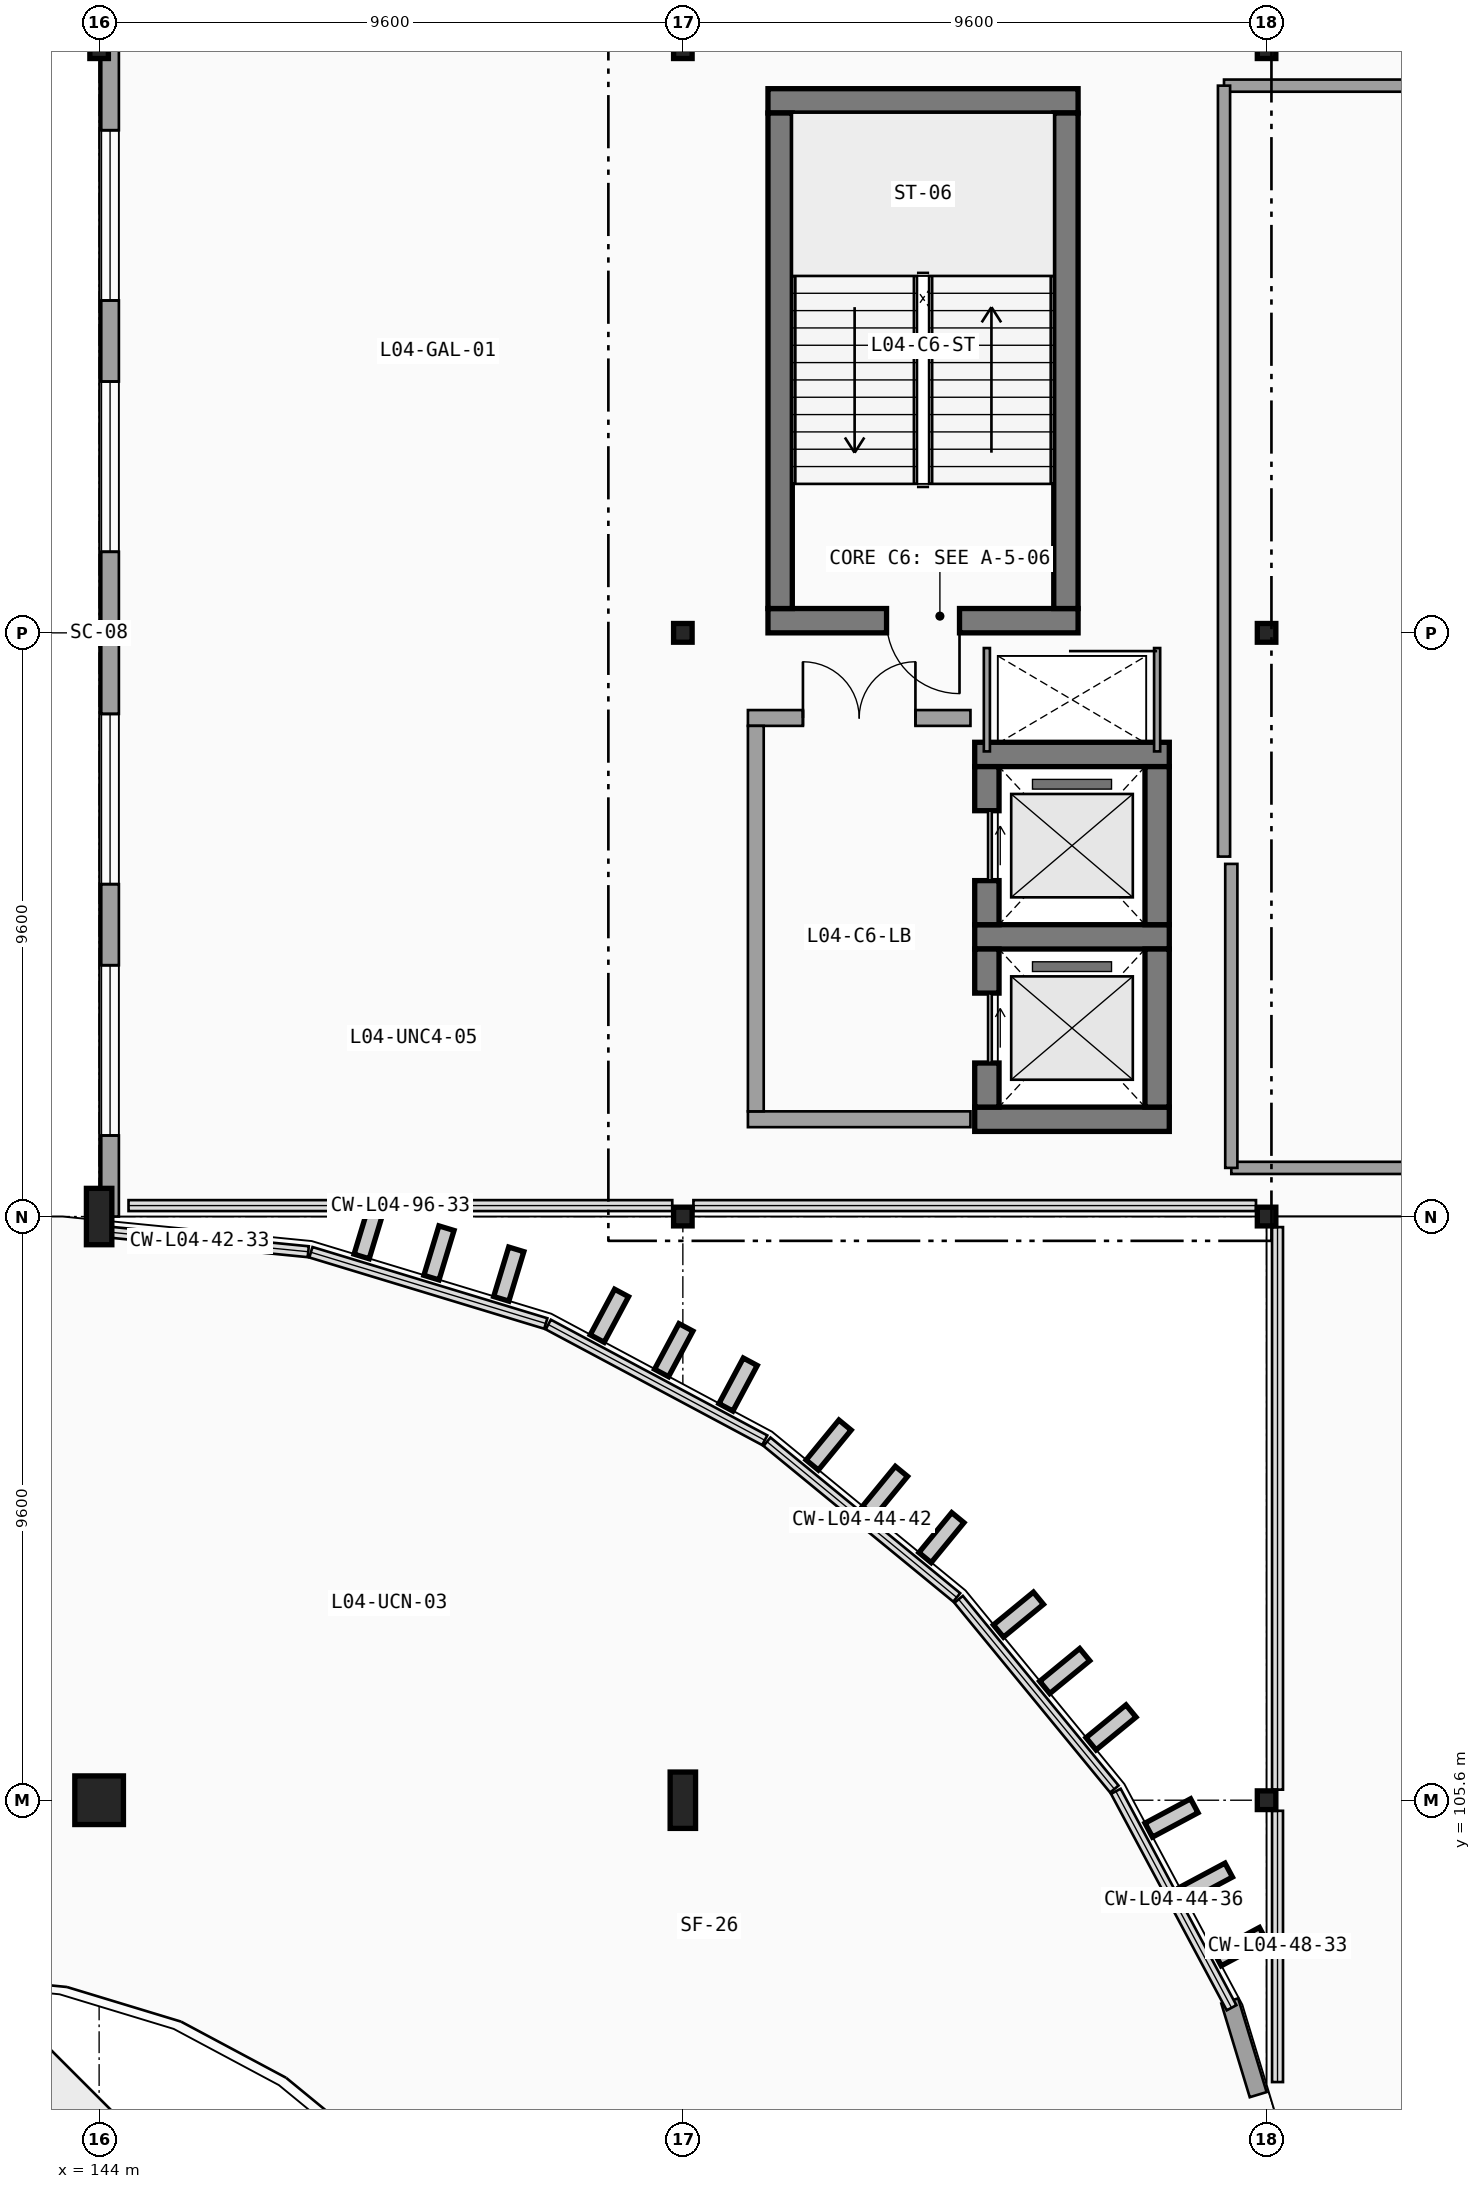
"""IFC4 building model, lengths in metres.
Left out: names, types, materials, properties, quantities, classifications, styles, units other than length and angle.
Written with IfcOpenShell. Run it as: python <this file> out.ifc"""

import sys

from ifc_helpers import new_model, si_unit, direction, frame, frame_2d, origin, origin_2d, place, context, subcontext, project, spatial, rectangle, i_section, extrude, element, fill, save


model = new_model("IFC4")
c1 = context("Model", 3, precision=1e-05, world=origin(), true_north=direction((0.0, 1.0)))
c2 = subcontext(c1, "Body", "Model", "MODEL_VIEW")
j1 = project(units=[si_unit("LENGTHUNIT", "METRE"), si_unit("PLANEANGLEUNIT", "RADIAN")], contexts=[c1])
p1 = place(None, origin())
s1 = spatial("IfcSite", under=j1, at=p1, CompositionType="ELEMENT")
p2 = place(p1, origin())
s2 = spatial("IfcBuilding", under=s1, at=p2, CompositionType="ELEMENT")
p3 = place(p2, frame((0.0, 0.0, 18.6)))
s3 = spatial("IfcBuildingStorey", under=s2, at=p3, CompositionType="ELEMENT", Elevation=18.6)
p4 = place(p3, frame((144.0, 105.6, 0.0), z_axis=(0.0, 0.0, 1.0), x_axis=(1.0, 0.0, 0.0)))
e1 = element("IfcColumn", 1, at=p4, inside=s3, PredefinedType="COLUMN", context=c2, shape_type="SweptSolid", body=[
    extrude(rectangle(XDim=0.8, YDim=0.8, at=origin_2d()), origin(), (0.0, 0.0, 1.0), 4.5),
])
p5 = place(p3, frame((144.0, 115.2, 0.0), z_axis=(0.0, 0.0, 1.0), x_axis=(1.0, 0.0, 0.0)))
e2 = element("IfcColumn", 2, at=p5, inside=s3, PredefinedType="COLUMN", context=c2, shape_type="SweptSolid", body=[
    extrude(i_section(OverallWidth=0.418, OverallDepth=0.927, WebThickness=0.019, FlangeThickness=0.032, FilletRadius=0.024, at=origin_2d()), origin(), (0.0, 0.0, 1.0), 4.5),
])
for number, where, z_axis, x_axis in (
    (3, (144.0, 124.8, 0.0), (0.0, 0.0, 1.0), (1.0, 0.0, 0.0)),
    (4, (144.0, 134.4, 0.0), (0.0, 0.0, 1.0), (1.0, 0.0, 0.0)),
):
    element("IfcColumn", number, at=place(p3, frame(where, z_axis=z_axis, x_axis=x_axis)), inside=s3, PredefinedType="COLUMN", context=c2, shape_type="SweptSolid", body=[
        extrude(i_section(OverallWidth=0.305, OverallDepth=0.308, WebThickness=0.01, FlangeThickness=0.015, FilletRadius=0.013, at=origin_2d()), origin(), (0.0, 0.0, 1.0), 4.5),
    ])
p6 = place(p3, frame((153.6, 105.6, 0.0), z_axis=(0.0, 0.0, 1.0), x_axis=(1.0, 0.0, 0.0)))
e5 = element("IfcColumn", 5, at=p6, inside=s3, PredefinedType="COLUMN", context=c2, shape_type="SweptSolid", body=[
    extrude(i_section(OverallWidth=0.418, OverallDepth=0.927, WebThickness=0.019, FlangeThickness=0.032, FilletRadius=0.024, at=origin_2d()), origin(), (0.0, 0.0, 1.0), 4.5),
])
for number, where, z_axis, x_axis in (
    (6, (153.6, 115.2, 0.0), (0.0, 0.0, 1.0), (1.0, 0.0, 0.0)),
    (7, (153.6, 124.8, 0.0), (0.0, 0.0, 1.0), (1.0, 0.0, 0.0)),
    (8, (153.6, 134.4, 0.0), (0.0, 0.0, 1.0), (1.0, 0.0, 0.0)),
    (9, (163.2, 105.6, 0.0), (0.0, 0.0, 1.0), (1.0, 0.0, 0.0)),
    (10, (163.2, 115.2, 0.0), (0.0, 0.0, 1.0), (1.0, 0.0, 0.0)),
    (11, (163.2, 124.8, 0.0), (0.0, 0.0, 1.0), (1.0, 0.0, 0.0)),
    (12, (163.2, 134.4, 0.0), (0.0, 0.0, 1.0), (1.0, 0.0, 0.0)),
):
    element("IfcColumn", number, at=place(p3, frame(where, z_axis=z_axis, x_axis=x_axis)), inside=s3, PredefinedType="COLUMN", context=c2, shape_type="SweptSolid", body=[
        extrude(i_section(OverallWidth=0.305, OverallDepth=0.308, WebThickness=0.01, FlangeThickness=0.015, FilletRadius=0.013, at=origin_2d()), origin(), (0.0, 0.0, 1.0), 4.5),
    ])
p7 = place(p3, frame((144.18, 134.4, 0.0), z_axis=(0.0, 0.0, 1.0), x_axis=(0.0, -1.0, 0.0)))
e13 = element("IfcWall", 13, at=p7, inside=s3, PredefinedType="SOLIDWALL", context=c2, shape_type="SweptSolid", body=[
    extrude(rectangle(XDim=9.6, YDim=0.29, at=frame_2d((4.8, 0.0))), origin(), (0.0, 0.0, 1.0), 3.562),
])
p8 = place(p7, frame((4.133, 0.0, 0.95), z_axis=(0.0, 0.0, 1.0), x_axis=(-1.0, 0.0, 0.0)))
e14 = element("IfcOpeningElement", 14, at=p8, cuts=e13, PredefinedType="OPENING", context=c2, shape_type="SweptSolid", body=[
    extrude(rectangle(XDim=2.8, YDim=1.9, at=frame_2d((1.4, 0.95))), frame((0.0, 0.155, 0.0), z_axis=(0.0, -1.0, 0.0), x_axis=(1.0, 0.0, 0.0)), (0.0, 0.0, 1.0), 0.31),
])
p9 = place(p7, frame((8.267, 0.0, 0.95), z_axis=(0.0, 0.0, 1.0), x_axis=(-1.0, 0.0, 0.0)))
e15 = element("IfcOpeningElement", 15, at=p9, cuts=e13, PredefinedType="OPENING", context=c2, shape_type="SweptSolid", body=[
    extrude(rectangle(XDim=2.8, YDim=1.9, at=frame_2d((1.4, 0.95))), frame((0.0, 0.155, 0.0), z_axis=(0.0, -1.0, 0.0), x_axis=(1.0, 0.0, 0.0)), (0.0, 0.0, 1.0), 0.31),
])
p10 = place(p3, frame((144.18, 124.8, 0.0), z_axis=(0.0, 0.0, 1.0), x_axis=(0.0, -1.0, 0.0)))
e16 = element("IfcWall", 16, at=p10, inside=s3, PredefinedType="SOLIDWALL", context=c2, shape_type="SweptSolid", body=[
    extrude(rectangle(XDim=9.6, YDim=0.29, at=frame_2d((4.8, 0.0))), origin(), (0.0, 0.0, 1.0), 3.313),
])
p11 = place(p10, frame((4.133, 0.0, 0.95), z_axis=(0.0, 0.0, 1.0), x_axis=(-1.0, 0.0, 0.0)))
e17 = element("IfcOpeningElement", 17, at=p11, cuts=e16, PredefinedType="OPENING", context=c2, shape_type="SweptSolid", body=[
    extrude(rectangle(XDim=2.8, YDim=1.9, at=frame_2d((1.4, 0.95))), frame((0.0, 0.155, 0.0), z_axis=(0.0, -1.0, 0.0), x_axis=(1.0, 0.0, 0.0)), (0.0, 0.0, 1.0), 0.31),
])
p12 = place(p10, frame((8.267, 0.0, 0.95), z_axis=(0.0, 0.0, 1.0), x_axis=(-1.0, 0.0, 0.0)))
e18 = element("IfcOpeningElement", 18, at=p12, cuts=e16, PredefinedType="OPENING", context=c2, shape_type="SweptSolid", body=[
    extrude(rectangle(XDim=2.8, YDim=1.9, at=frame_2d((1.4, 0.95))), frame((0.0, 0.155, 0.0), z_axis=(0.0, -1.0, 0.0), x_axis=(1.0, 0.0, 0.0)), (0.0, 0.0, 1.0), 0.31),
])
p13 = place(p3, frame((163.062, 100.757, 0.0), z_axis=(0.0, 0.0, 1.0), x_axis=(-0.290196653702, 0.956967032964, 0.0)))
e19 = element("IfcWall", 19, at=p13, inside=s3, PredefinedType="SOLIDWALL", context=c2, shape_type="SweptSolid", body=[
    extrude(rectangle(XDim=1.611, YDim=0.29, at=frame_2d((0.806, 0.0))), origin(), (0.0, 0.0, 1.0), 3.313),
])
p14 = place(p3, frame((155.0, 125.0, 0.0), z_axis=(0.0, 0.0, 1.0), x_axis=(1.0, 0.0, 0.0)))
e20 = element("IfcWall", 20, at=p14, inside=s3, PredefinedType="SHEAR", context=c2, shape_type="SweptSolid", body=[
    extrude(rectangle(XDim=5.1, YDim=0.4, at=frame_2d((2.55, 0.0))), origin(), (0.0, 0.0, 1.0), 4.24),
])
p15 = place(p14, frame((3.15, 0.0, 0.0), z_axis=(0.0, 0.0, 1.0), x_axis=(-1.0, 0.0, 0.0)))
e21 = element("IfcOpeningElement", 21, at=p15, cuts=e20, PredefinedType="OPENING", context=c2, shape_type="SweptSolid", body=[
    extrude(rectangle(XDim=1.2, YDim=2.2, at=frame_2d((0.6, 1.1))), frame((0.0, 0.21, 0.0), z_axis=(0.0, -1.0, 0.0), x_axis=(1.0, 0.0, 0.0)), (0.0, 0.0, 1.0), 0.42),
])
p16 = place(p3, frame((160.1, 133.55, 0.0), z_axis=(0.0, 0.0, 1.0), x_axis=(-1.0, 0.0, 0.0)))
e22 = element("IfcWall", 22, at=p16, inside=s3, PredefinedType="SHEAR", context=c2, shape_type="SweptSolid", body=[
    extrude(rectangle(XDim=5.1, YDim=0.4, at=frame_2d((2.55, 0.0))), origin(), (0.0, 0.0, 1.0), 4.24),
])
for number, where, z_axis, x_axis in (
    (23, (155.2, 133.35, 0.0), (0.0, 0.0, 1.0), (0.0, -1.0, 0.0)),
    (24, (159.9, 125.2, 0.0), (0.0, 0.0, 1.0), (0.0, 1.0, 0.0)),
):
    element("IfcWall", number, at=place(p3, frame(where, z_axis=z_axis, x_axis=x_axis)), inside=s3, PredefinedType="SHEAR", context=c2, shape_type="SweptSolid", body=[
        extrude(rectangle(XDim=8.15, YDim=0.4, at=frame_2d((4.075, 0.0))), origin(), (0.0, 0.0, 1.0), 4.24),
    ])
for number, where, z_axis, x_axis in (
    (25, (158.4, 116.8, 0.0), (0.0, 0.0, 1.0), (1.0, 0.0, 0.0)),
    (26, (161.6, 119.8, 0.0), (0.0, 0.0, 1.0), (-1.0, 0.0, 0.0)),
):
    element("IfcWall", number, at=place(p3, frame(where, z_axis=z_axis, x_axis=x_axis)), inside=s3, PredefinedType="SHEAR", context=c2, shape_type="SweptSolid", body=[
        extrude(rectangle(XDim=3.2, YDim=0.4, at=frame_2d((1.6, 0.0))), origin(), (0.0, 0.0, 1.0), 4.24),
    ])
p17 = place(p3, frame((158.6, 119.6, 0.0), z_axis=(0.0, 0.0, 1.0), x_axis=(0.0, -1.0, 0.0)))
e27 = element("IfcWall", 27, at=p17, inside=s3, PredefinedType="SHEAR", context=c2, shape_type="SweptSolid", body=[
    extrude(rectangle(XDim=2.6, YDim=0.4, at=frame_2d((1.3, 0.0))), origin(), (0.0, 0.0, 1.0), 4.24),
])
p18 = place(p17, frame((0.725, 0.0, 0.0), z_axis=(0.0, 0.0, 1.0), x_axis=(1.0, 0.0, 0.0)))
e28 = element("IfcOpeningElement", 28, at=p18, cuts=e27, PredefinedType="OPENING", context=c2, shape_type="SweptSolid", body=[
    extrude(rectangle(XDim=1.15, YDim=2.2, at=frame_2d((0.575, 1.1))), frame((0.0, 0.21, 0.0), z_axis=(0.0, -1.0, 0.0), x_axis=(1.0, 0.0, 0.0)), (0.0, 0.0, 1.0), 0.42),
])
p19 = place(p3, frame((161.4, 117.0, 0.0), z_axis=(0.0, 0.0, 1.0), x_axis=(0.0, 1.0, 0.0)))
e29 = element("IfcWall", 29, at=p19, inside=s3, PredefinedType="SHEAR", context=c2, shape_type="SweptSolid", body=[
    extrude(rectangle(XDim=2.6, YDim=0.4, at=frame_2d((1.3, 0.0))), origin(), (0.0, 0.0, 1.0), 4.24),
])
p20 = place(p3, frame((161.6, 122.8, 0.0), z_axis=(0.0, 0.0, 1.0), x_axis=(-1.0, 0.0, 0.0)))
e30 = element("IfcWall", 30, at=p20, inside=s3, PredefinedType="SHEAR", context=c2, shape_type="SweptSolid", body=[
    extrude(rectangle(XDim=3.2, YDim=0.4, at=frame_2d((1.6, 0.0))), origin(), (0.0, 0.0, 1.0), 4.24),
])
p21 = place(p3, frame((158.6, 122.6, 0.0), z_axis=(0.0, 0.0, 1.0), x_axis=(0.0, -1.0, 0.0)))
e31 = element("IfcWall", 31, at=p21, inside=s3, PredefinedType="SHEAR", context=c2, shape_type="SweptSolid", body=[
    extrude(rectangle(XDim=2.6, YDim=0.4, at=frame_2d((1.3, 0.0))), origin(), (0.0, 0.0, 1.0), 4.24),
])
p22 = place(p21, frame((0.725, 0.0, 0.0), z_axis=(0.0, 0.0, 1.0), x_axis=(1.0, 0.0, 0.0)))
e32 = element("IfcOpeningElement", 32, at=p22, cuts=e31, PredefinedType="OPENING", context=c2, shape_type="SweptSolid", body=[
    extrude(rectangle(XDim=1.15, YDim=2.2, at=frame_2d((0.575, 1.1))), frame((0.0, 0.21, 0.0), z_axis=(0.0, -1.0, 0.0), x_axis=(1.0, 0.0, 0.0)), (0.0, 0.0, 1.0), 0.42),
])
p23 = place(p3, frame((161.4, 120.0, 0.0), z_axis=(0.0, 0.0, 1.0), x_axis=(0.0, 1.0, 0.0)))
e33 = element("IfcWall", 33, at=p23, inside=s3, PredefinedType="SHEAR", context=c2, shape_type="SweptSolid", body=[
    extrude(rectangle(XDim=2.6, YDim=0.4, at=frame_2d((1.3, 0.0))), origin(), (0.0, 0.0, 1.0), 4.24),
])
for number, where, z_axis, x_axis in (
    (34, (158.6, 124.55, 0.0), (0.0, 0.0, 1.0), (0.0, -1.0, 0.0)),
    (35, (161.4, 122.85, 0.0), (0.0, 0.0, 1.0), (0.0, 1.0, 0.0)),
):
    element("IfcWall", number, at=place(p3, frame(where, z_axis=z_axis, x_axis=x_axis)), inside=s3, PredefinedType="PARTITIONING", context=c2, shape_type="SweptSolid", body=[
        extrude(rectangle(XDim=1.7, YDim=0.1, at=frame_2d((0.85, 0.0))), origin(), (0.0, 0.0, 1.0), 4.24),
    ])
p24 = place(p3, frame((154.67, 116.8, 0.0), z_axis=(0.0, 0.0, 1.0), x_axis=(1.0, 0.0, 0.0)))
e36 = element("IfcWall", 36, at=p24, inside=s3, PredefinedType="SOLIDWALL", context=c2, shape_type="SweptSolid", body=[
    extrude(rectangle(XDim=3.66, YDim=0.26, at=frame_2d((1.83, 0.0))), origin(), (0.0, 0.0, 1.0), 4.24),
])
p25 = place(p3, frame((158.33, 123.4, 0.0), z_axis=(0.0, 0.0, 1.0), x_axis=(-1.0, 0.0, 0.0)))
e37 = element("IfcWall", 37, at=p25, inside=s3, PredefinedType="SOLIDWALL", context=c2, shape_type="SweptSolid", body=[
    extrude(rectangle(XDim=3.66, YDim=0.26, at=frame_2d((1.83, 0.0))), origin(), (0.0, 0.0, 1.0), 4.24),
])
p26 = place(p25, frame((2.755, 0.0, 0.0), z_axis=(0.0, 0.0, 1.0), x_axis=(-1.0, 0.0, 0.0)))
e38 = element("IfcOpeningElement", 38, at=p26, cuts=e37, PredefinedType="OPENING", context=c2, shape_type="SweptSolid", body=[
    extrude(rectangle(XDim=1.85, YDim=2.25, at=frame_2d((0.925, 1.125))), frame((0.0, 0.14, 0.0), z_axis=(0.0, -1.0, 0.0), x_axis=(1.0, 0.0, 0.0)), (0.0, 0.0, 1.0), 0.28),
])
p27 = place(p3, frame((154.8, 123.27, 0.0), z_axis=(0.0, 0.0, 1.0), x_axis=(0.0, -1.0, 0.0)))
e39 = element("IfcWall", 39, at=p27, inside=s3, PredefinedType="SOLIDWALL", context=c2, shape_type="SweptSolid", body=[
    extrude(rectangle(XDim=6.34, YDim=0.26, at=frame_2d((3.17, 0.0))), origin(), (0.0, 0.0, 1.0), 4.24),
])
p28 = place(p3, frame((162.5, 133.8, 0.0), z_axis=(0.0, 0.0, 1.0), x_axis=(1.0, 0.0, 0.0)))
e40 = element("IfcWall", 40, at=p28, inside=s3, PredefinedType="PARTITIONING", context=c2, shape_type="SweptSolid", body=[
    extrude(rectangle(XDim=29.0, YDim=0.2, at=frame_2d((14.5, 0.0))), origin(), (0.0, 0.0, 1.0), 3.49),
])
p29 = place(p3, frame((191.5, 116.0, 0.0), z_axis=(0.0, 0.0, 1.0), x_axis=(-1.0, 0.0, 0.0)))
e41 = element("IfcWall", 41, at=p29, inside=s3, PredefinedType="PARTITIONING", context=c2, shape_type="SweptSolid", body=[
    extrude(rectangle(XDim=28.88, YDim=0.2, at=frame_2d((14.44, 0.0))), origin(), (0.0, 0.0, 1.0), 3.313),
])
p30 = place(p29, frame((3.55, 0.0, 0.0), z_axis=(0.0, 0.0, 1.0), x_axis=(1.0, 0.0, 0.0)))
e42 = element("IfcOpeningElement", 42, at=p30, cuts=e41, PredefinedType="OPENING", context=c2, shape_type="SweptSolid", body=[
    extrude(rectangle(XDim=1.5, YDim=2.25, at=frame_2d((0.75, 1.125))), frame((0.0, 0.11, 0.0), z_axis=(0.0, -1.0, 0.0), x_axis=(1.0, 0.0, 0.0)), (0.0, 0.0, 1.0), 0.22),
])
p31 = place(p3, frame((162.62, 116.0, 0.0), z_axis=(0.0, 0.0, 1.0), x_axis=(0.0, 1.0, 0.0)))
e43 = element("IfcWall", 43, at=p31, inside=s3, PredefinedType="PARTITIONING", context=c2, shape_type="SweptSolid", body=[
    extrude(rectangle(XDim=5.0, YDim=0.2, at=frame_2d((2.5, 0.0))), origin(), (0.0, 0.0, 1.0), 4.24),
])
p32 = place(p3, frame((162.5, 121.12, 0.0), z_axis=(0.0, 0.0, 1.0), x_axis=(0.0, 1.0, 0.0)))
e44 = element("IfcWall", 44, at=p32, inside=s3, PredefinedType="PARTITIONING", context=c2, shape_type="SweptSolid", body=[
    extrude(rectangle(XDim=12.68, YDim=0.2, at=frame_2d((6.34, 0.0))), origin(), (0.0, 0.0, 1.0), 3.562),
])
p33 = place(p8, origin())
e45 = element("IfcWindow", 45, at=p33, inside=s3, PartitioningType="SINGLE_PANEL", PredefinedType="WINDOW", context=c2, shape_type="SweptSolid", body=[
    extrude(rectangle(XDim=2.8, YDim=1.9, at=frame_2d((1.4, 0.95))), frame((0.0, 0.03, 0.0), z_axis=(0.0, -1.0, 0.0), x_axis=(1.0, 0.0, 0.0)), (0.0, 0.0, 1.0), 0.06),
])
fill(e14, e45)
p34 = place(p9, origin())
e46 = element("IfcWindow", 46, at=p34, inside=s3, PartitioningType="SINGLE_PANEL", PredefinedType="WINDOW", context=c2, shape_type="SweptSolid", body=[
    extrude(rectangle(XDim=2.8, YDim=1.9, at=frame_2d((1.4, 0.95))), frame((0.0, 0.03, 0.0), z_axis=(0.0, -1.0, 0.0), x_axis=(1.0, 0.0, 0.0)), (0.0, 0.0, 1.0), 0.06),
])
fill(e15, e46)
p35 = place(p11, origin())
e47 = element("IfcWindow", 47, at=p35, inside=s3, PartitioningType="SINGLE_PANEL", PredefinedType="WINDOW", context=c2, shape_type="SweptSolid", body=[
    extrude(rectangle(XDim=2.8, YDim=1.9, at=frame_2d((1.4, 0.95))), frame((0.0, 0.03, 0.0), z_axis=(0.0, -1.0, 0.0), x_axis=(1.0, 0.0, 0.0)), (0.0, 0.0, 1.0), 0.06),
])
fill(e17, e47)
p36 = place(p12, origin())
e48 = element("IfcWindow", 48, at=p36, inside=s3, PartitioningType="SINGLE_PANEL", PredefinedType="WINDOW", context=c2, shape_type="SweptSolid", body=[
    extrude(rectangle(XDim=2.8, YDim=1.9, at=frame_2d((1.4, 0.95))), frame((0.0, 0.03, 0.0), z_axis=(0.0, -1.0, 0.0), x_axis=(1.0, 0.0, 0.0)), (0.0, 0.0, 1.0), 0.06),
])
fill(e18, e48)
p37 = place(p15, origin())
e49 = element("IfcDoor", 49, at=p37, inside=s3, OperationType="SINGLE_SWING_LEFT", PredefinedType="DOOR", context=c2, shape_type="SweptSolid", body=[
    extrude(rectangle(XDim=1.2, YDim=2.2, at=frame_2d((0.6, 1.1))), frame((0.0, 0.025, 0.0), z_axis=(0.0, -1.0, 0.0), x_axis=(1.0, 0.0, 0.0)), (0.0, 0.0, 1.0), 0.05),
])
fill(e21, e49)
p38 = place(p18, origin())
e50 = element("IfcDoor", 50, at=p38, inside=s3, OperationType="SLIDING_TO_LEFT", PredefinedType="DOOR", context=c2, shape_type="SweptSolid", body=[
    extrude(rectangle(XDim=1.15, YDim=2.2, at=frame_2d((0.575, 1.1))), frame((0.0, 0.025, 0.0), z_axis=(0.0, -1.0, 0.0), x_axis=(1.0, 0.0, 0.0)), (0.0, 0.0, 1.0), 0.05),
])
fill(e28, e50)
p39 = place(p22, origin())
e51 = element("IfcDoor", 51, at=p39, inside=s3, OperationType="SLIDING_TO_LEFT", PredefinedType="DOOR", context=c2, shape_type="SweptSolid", body=[
    extrude(rectangle(XDim=1.15, YDim=2.2, at=frame_2d((0.575, 1.1))), frame((0.0, 0.025, 0.0), z_axis=(0.0, -1.0, 0.0), x_axis=(1.0, 0.0, 0.0)), (0.0, 0.0, 1.0), 0.05),
])
fill(e32, e51)
p40 = place(p26, origin())
e52 = element("IfcDoor", 52, at=p40, inside=s3, OperationType="DOUBLE_DOOR_SINGLE_SWING", PredefinedType="DOOR", context=c2, shape_type="SweptSolid", body=[
    extrude(rectangle(XDim=1.85, YDim=2.25, at=frame_2d((0.925, 1.125))), frame((0.0, 0.025, 0.0), z_axis=(0.0, -1.0, 0.0), x_axis=(1.0, 0.0, 0.0)), (0.0, 0.0, 1.0), 0.05),
])
fill(e38, e52)
save(model, sys.argv[1])
